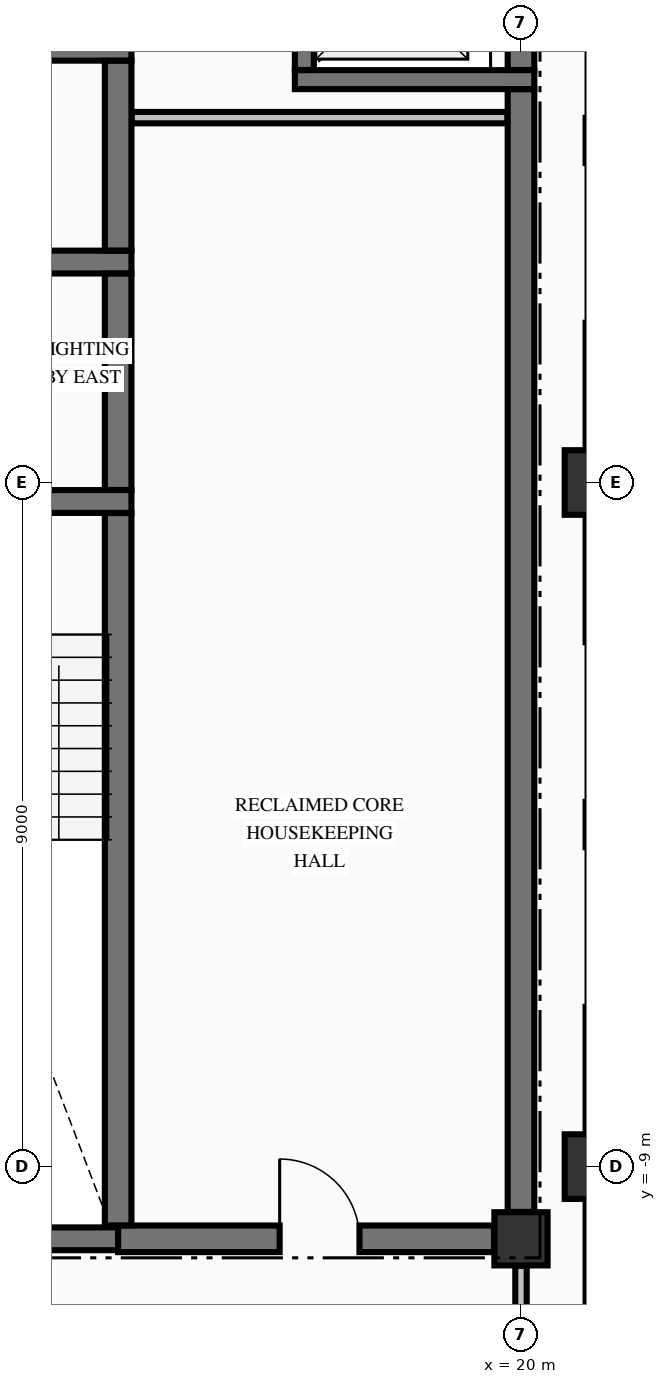
"""IFC4 building model, lengths in metres.
Left out: names, types, materials, properties, quantities, classifications, styles, units other than length and angle.
Written with IfcOpenShell. Run it as: python <this file> out.ifc"""

import sys

from ifc_helpers import new_model, si_unit, direction, frame, frame_2d, origin, origin_2d, place, context, subcontext, project, spatial, rectangle, extrude, element, fill, save


model = new_model("IFC4")
c1 = context("Model", 3, precision=1e-05, world=origin(), true_north=direction((0.0, 1.0)))
c2 = subcontext(c1, "Body", "Model", "MODEL_VIEW")
j1 = project(units=[si_unit("LENGTHUNIT", "METRE"), si_unit("PLANEANGLEUNIT", "RADIAN")], contexts=[c1])
p1 = place(None, origin())
s1 = spatial("IfcSite", under=j1, at=p1, CompositionType="ELEMENT")
p2 = place(p1, origin())
s2 = spatial("IfcBuilding", under=s1, at=p2, CompositionType="ELEMENT")
p3 = place(p2, frame((0.0, 0.0, 264.12)))
s3 = spatial("IfcBuildingStorey", under=s2, at=p3, CompositionType="ELEMENT", Elevation=264.12)
for number, where, z_axis, x_axis in (
    (1, (21.0, -9.0, -0.25), (0.0, 0.0, 1.0), (1.0, 0.0, 0.0)),
    (2, (21.0, 0.0, -0.25), (0.0, 0.0, 1.0), (1.0, 0.0, 0.0)),
):
    element("IfcColumn", number, at=place(p3, frame(where, z_axis=z_axis, x_axis=x_axis)), inside=s3, PredefinedType="COLUMN", context=c2, shape_type="SweptSolid", body=[
        extrude(rectangle(XDim=0.85, YDim=0.85, at=origin_2d()), origin(), (0.0, 0.0, 1.0), 3.23),
    ])
p4 = place(p3, frame((20.0, -9.95, -0.25), z_axis=(0.0, 0.0, 1.0), x_axis=(1.0, 0.0, 0.0)))
e3 = element("IfcColumn", 3, at=p4, inside=s3, PredefinedType="COLUMN", context=c2, shape_type="SweptSolid", body=[
    extrude(rectangle(XDim=0.7, YDim=0.7, at=origin_2d()), origin(), (0.0, 0.0, 1.0), 3.23),
])
p5 = place(p3, frame((21.0, -17.545, 0.0), z_axis=(0.0, 0.0, 1.0), x_axis=(0.0, 1.0, 0.0)))
e4 = element("IfcWall", 4, at=p5, inside=s3, PredefinedType="STANDARD", context=c2, shape_type="SweptSolid", body=[
    extrude(rectangle(XDim=8.09, YDim=0.3, at=frame_2d((4.045, 0.0))), origin(), (0.0, 0.0, 1.0), 2.372),
])
p6 = place(p3, frame((21.0, -8.545, 0.0), z_axis=(0.0, 0.0, 1.0), x_axis=(0.0, 1.0, 0.0)))
e5 = element("IfcWall", 5, at=p6, inside=s3, PredefinedType="STANDARD", context=c2, shape_type="SweptSolid", body=[
    extrude(rectangle(XDim=8.09, YDim=0.3, at=frame_2d((4.045, 0.0))), origin(), (0.0, 0.0, 1.0), 2.372),
])
p7 = place(p6, frame((1.647, 0.0, 0.7)))
e6 = element("IfcOpeningElement", 6, at=p7, cuts=e5, PredefinedType="OPENING", context=c2, shape_type="SweptSolid", body=[
    extrude(rectangle(XDim=2.1, YDim=1.5, at=frame_2d((1.05, 0.75))), frame((0.0, 0.16, 0.0), z_axis=(0.0, -1.0, 0.0), x_axis=(1.0, 0.0, 0.0)), (0.0, 0.0, 1.0), 0.32),
])
p8 = place(p6, frame((4.343, 0.0, 0.7)))
e7 = element("IfcOpeningElement", 7, at=p8, cuts=e5, PredefinedType="OPENING", context=c2, shape_type="SweptSolid", body=[
    extrude(rectangle(XDim=2.1, YDim=1.5, at=frame_2d((1.05, 0.75))), frame((0.0, 0.16, 0.0), z_axis=(0.0, -1.0, 0.0), x_axis=(1.0, 0.0, 0.0)), (0.0, 0.0, 1.0), 0.32),
])
p9 = place(p3, frame((21.0, 0.455, 0.0), z_axis=(0.0, 0.0, 1.0), x_axis=(0.0, 1.0, 0.0)))
e8 = element("IfcWall", 8, at=p9, inside=s3, PredefinedType="STANDARD", context=c2, shape_type="SweptSolid", body=[
    extrude(rectangle(XDim=8.09, YDim=0.3, at=frame_2d((4.045, 0.0))), origin(), (0.0, 0.0, 1.0), 2.372),
])
p10 = place(p9, frame((1.647, 0.0, 0.7)))
e9 = element("IfcOpeningElement", 9, at=p10, cuts=e8, PredefinedType="OPENING", context=c2, shape_type="SweptSolid", body=[
    extrude(rectangle(XDim=2.1, YDim=1.5, at=frame_2d((1.05, 0.75))), frame((0.0, 0.16, 0.0), z_axis=(0.0, -1.0, 0.0), x_axis=(1.0, 0.0, 0.0)), (0.0, 0.0, 1.0), 0.32),
])
p11 = place(p9, frame((4.343, 0.0, 0.7)))
e10 = element("IfcOpeningElement", 10, at=p11, cuts=e8, PredefinedType="OPENING", context=c2, shape_type="SweptSolid", body=[
    extrude(rectangle(XDim=2.1, YDim=1.5, at=frame_2d((1.05, 0.75))), frame((0.0, 0.16, 0.0), z_axis=(0.0, -1.0, 0.0), x_axis=(1.0, 0.0, 0.0)), (0.0, 0.0, 1.0), 0.32),
])
p12 = place(p3, frame((11.354, -9.95, 0.0), z_axis=(0.0, 0.0, 1.0), x_axis=(1.0, 0.0, 0.0)))
e11 = element("IfcWall", 11, at=p12, inside=s3, PredefinedType="SHEAR", context=c2, shape_type="SweptSolid", body=[
    extrude(rectangle(XDim=3.346, YDim=0.3, at=frame_2d((1.673, 0.0))), origin(), (0.0, 0.0, 1.0), 2.98),
])
p13 = place(p3, frame((14.7, -9.95, 0.0), z_axis=(0.0, 0.0, 1.0), x_axis=(1.0, 0.0, 0.0)))
e12 = element("IfcWall", 12, at=p13, inside=s3, PredefinedType="SHEAR", context=c2, shape_type="SweptSolid", body=[
    extrude(rectangle(XDim=4.946, YDim=0.35, at=frame_2d((2.473, 0.0))), origin(), (0.0, 0.0, 1.0), 2.98),
])
p14 = place(p13, frame((2.125, 0.0, 0.0)))
e13 = element("IfcOpeningElement", 13, at=p14, cuts=e12, PredefinedType="OPENING", context=c2, shape_type="SweptSolid", body=[
    extrude(rectangle(XDim=1.05, YDim=2.15, at=frame_2d((0.525, 1.075))), frame((0.0, 0.185, 0.0), z_axis=(0.0, -1.0, 0.0), x_axis=(1.0, 0.0, 0.0)), (0.0, 0.0, 1.0), 0.37),
])
p15 = place(p3, frame((11.354, -0.25, 0.0), z_axis=(0.0, 0.0, 1.0), x_axis=(1.0, 0.0, 0.0)))
e14 = element("IfcWall", 14, at=p15, inside=s3, PredefinedType="SHEAR", context=c2, shape_type="SweptSolid", body=[
    extrude(rectangle(XDim=3.521, YDim=0.3, at=frame_2d((1.76, 0.0))), origin(), (0.0, 0.0, 1.0), 2.98),
])
p16 = place(p15, frame((1.246, 0.0, 0.0)))
e15 = element("IfcOpeningElement", 15, at=p16, cuts=e14, PredefinedType="OPENING", context=c2, shape_type="SweptSolid", body=[
    extrude(rectangle(XDim=1.1, YDim=2.15, at=frame_2d((0.55, 1.075))), frame((0.0, 0.16, 0.0), z_axis=(0.0, -1.0, 0.0), x_axis=(1.0, 0.0, 0.0)), (0.0, 0.0, 1.0), 0.32),
])
p17 = place(p3, frame((10.85, 2.9, 0.0), z_axis=(0.0, 0.0, 1.0), x_axis=(1.0, 0.0, 0.0)))
e16 = element("IfcWall", 16, at=p17, inside=s3, PredefinedType="SHEAR", context=c2, shape_type="SweptSolid", body=[
    extrude(rectangle(XDim=4.025, YDim=0.3, at=frame_2d((2.012, 0.0))), origin(), (0.0, 0.0, 1.0), 2.98),
])
p18 = place(p17, frame((0.85, 0.0, 0.0)))
e17 = element("IfcOpeningElement", 17, at=p18, cuts=e16, PredefinedType="OPENING", context=c2, shape_type="SweptSolid", body=[
    extrude(rectangle(XDim=1.1, YDim=2.2, at=frame_2d((0.55, 1.1))), frame((0.0, 0.16, 0.0), z_axis=(0.0, -1.0, 0.0), x_axis=(1.0, 0.0, 0.0)), (0.0, 0.0, 1.0), 0.32),
])
p19 = place(p3, frame((17.025, 5.3, 0.0), z_axis=(0.0, 0.0, 1.0), x_axis=(1.0, 0.0, 0.0)))
e18 = element("IfcWall", 18, at=p19, inside=s3, PredefinedType="SOLIDWALL", context=c2, shape_type="SweptSolid", body=[
    extrude(rectangle(XDim=3.15, YDim=0.25, at=frame_2d((1.575, 0.0))), origin(), (0.0, 0.0, 1.0), 2.98),
])
p20 = place(p3, frame((10.85, 5.7, 0.0), z_axis=(0.0, 0.0, 1.0), x_axis=(1.0, 0.0, 0.0)))
e19 = element("IfcWall", 19, at=p20, inside=s3, PredefinedType="SHEAR", context=c2, shape_type="SweptSolid", body=[
    extrude(rectangle(XDim=4.025, YDim=0.3, at=frame_2d((2.012, 0.0))), origin(), (0.0, 0.0, 1.0), 2.98),
])
p21 = place(p3, frame((14.878, 4.8, 0.0), z_axis=(0.0, 0.0, 1.0), x_axis=(1.0, 0.0, 0.0)))
e20 = element("IfcWall", 20, at=p21, inside=s3, PredefinedType="PARTITIONING", context=c2, shape_type="SweptSolid", body=[
    extrude(rectangle(XDim=4.944, YDim=0.15, at=frame_2d((2.472, 0.0))), origin(), (0.0, 0.0, 1.0), 2.98),
])
p22 = place(p3, frame((14.7, -9.773, 0.0), z_axis=(0.0, 0.0, 1.0), x_axis=(0.0, 1.0, 0.0)))
e21 = element("IfcWall", 21, at=p22, inside=s3, PredefinedType="SHEAR", context=c2, shape_type="SweptSolid", body=[
    extrude(rectangle(XDim=9.371, YDim=0.35, at=frame_2d((4.686, 0.0))), origin(), (0.0, 0.0, 1.0), 2.98),
])
p23 = place(p3, frame((14.7, -0.098, 0.0), z_axis=(0.0, 0.0, 1.0), x_axis=(0.0, 1.0, 0.0)))
e22 = element("IfcWall", 22, at=p23, inside=s3, PredefinedType="SHEAR", context=c2, shape_type="SweptSolid", body=[
    extrude(rectangle(XDim=2.846, YDim=0.35, at=frame_2d((1.423, 0.0))), origin(), (0.0, 0.0, 1.0), 2.98),
])
p24 = place(p3, frame((14.7, 3.052, 0.0), z_axis=(0.0, 0.0, 1.0), x_axis=(0.0, 1.0, 0.0)))
e23 = element("IfcWall", 23, at=p24, inside=s3, PredefinedType="SHEAR", context=c2, shape_type="SweptSolid", body=[
    extrude(rectangle(XDim=2.496, YDim=0.35, at=frame_2d((1.248, 0.0))), origin(), (0.0, 0.0, 1.0), 2.98),
])
p25 = place(p3, frame((17.15, 5.427, 0.0), z_axis=(0.0, 0.0, 1.0), x_axis=(0.0, 1.0, 0.0)))
e24 = element("IfcWall", 24, at=p25, inside=s3, PredefinedType="SOLIDWALL", context=c2, shape_type="SweptSolid", body=[
    extrude(rectangle(XDim=2.196, YDim=0.25, at=frame_2d((1.098, 0.0))), origin(), (0.0, 0.0, 1.0), 2.98),
])
p26 = place(p25, frame((0.548, 0.0, 0.0)))
e25 = element("IfcOpeningElement", 25, at=p26, cuts=e24, PredefinedType="OPENING", context=c2, shape_type="SweptSolid", body=[
    extrude(rectangle(XDim=1.1, YDim=2.2, at=frame_2d((0.55, 1.1))), frame((0.0, 0.135, 0.0), z_axis=(0.0, -1.0, 0.0), x_axis=(1.0, 0.0, 0.0)), (0.0, 0.0, 1.0), 0.27),
])
p27 = place(p3, frame((20.0, -9.596, 0.0), z_axis=(0.0, 0.0, 1.0), x_axis=(0.0, 1.0, 0.0)))
e26 = element("IfcWall", 26, at=p27, inside=s3, PredefinedType="SHEAR", context=c2, shape_type="SweptSolid", body=[
    extrude(rectangle(XDim=14.769, YDim=0.35, at=frame_2d((7.385, 0.0))), origin(), (0.0, 0.0, 1.0), 2.98),
])
p28 = place(p3, frame((20.0, 5.427, 0.0), z_axis=(0.0, 0.0, 1.0), x_axis=(0.0, 1.0, 0.0)))
e27 = element("IfcWall", 27, at=p28, inside=s3, PredefinedType="SHEAR", context=c2, shape_type="SweptSolid", body=[
    extrude(rectangle(XDim=2.196, YDim=0.35, at=frame_2d((1.098, 0.0))), origin(), (0.0, 0.0, 1.0), 2.98),
])
p29 = place(p3, frame((20.0, -12.672, 0.0), z_axis=(0.0, 0.0, 1.0), x_axis=(0.0, 1.0, 0.0)))
e28 = element("IfcWall", 28, at=p29, inside=s3, PredefinedType="PARTITIONING", context=c2, shape_type="SweptSolid", body=[
    extrude(rectangle(XDim=2.366, YDim=0.15, at=frame_2d((1.183, 0.0))), origin(), (0.0, 0.0, 1.0), 2.57),
])
p30 = place(p14, origin())
e29 = element("IfcDoor", 29, at=p30, inside=s3, OperationType="SINGLE_SWING_LEFT", PredefinedType="DOOR", context=c2, shape_type="SweptSolid", body=[
    extrude(rectangle(XDim=1.05, YDim=2.15, at=frame_2d((0.525, 1.075))), frame((0.0, 0.025, 0.0), z_axis=(0.0, -1.0, 0.0), x_axis=(1.0, 0.0, 0.0)), (0.0, 0.0, 1.0), 0.05),
])
fill(e13, e29)
save(model, sys.argv[1])
